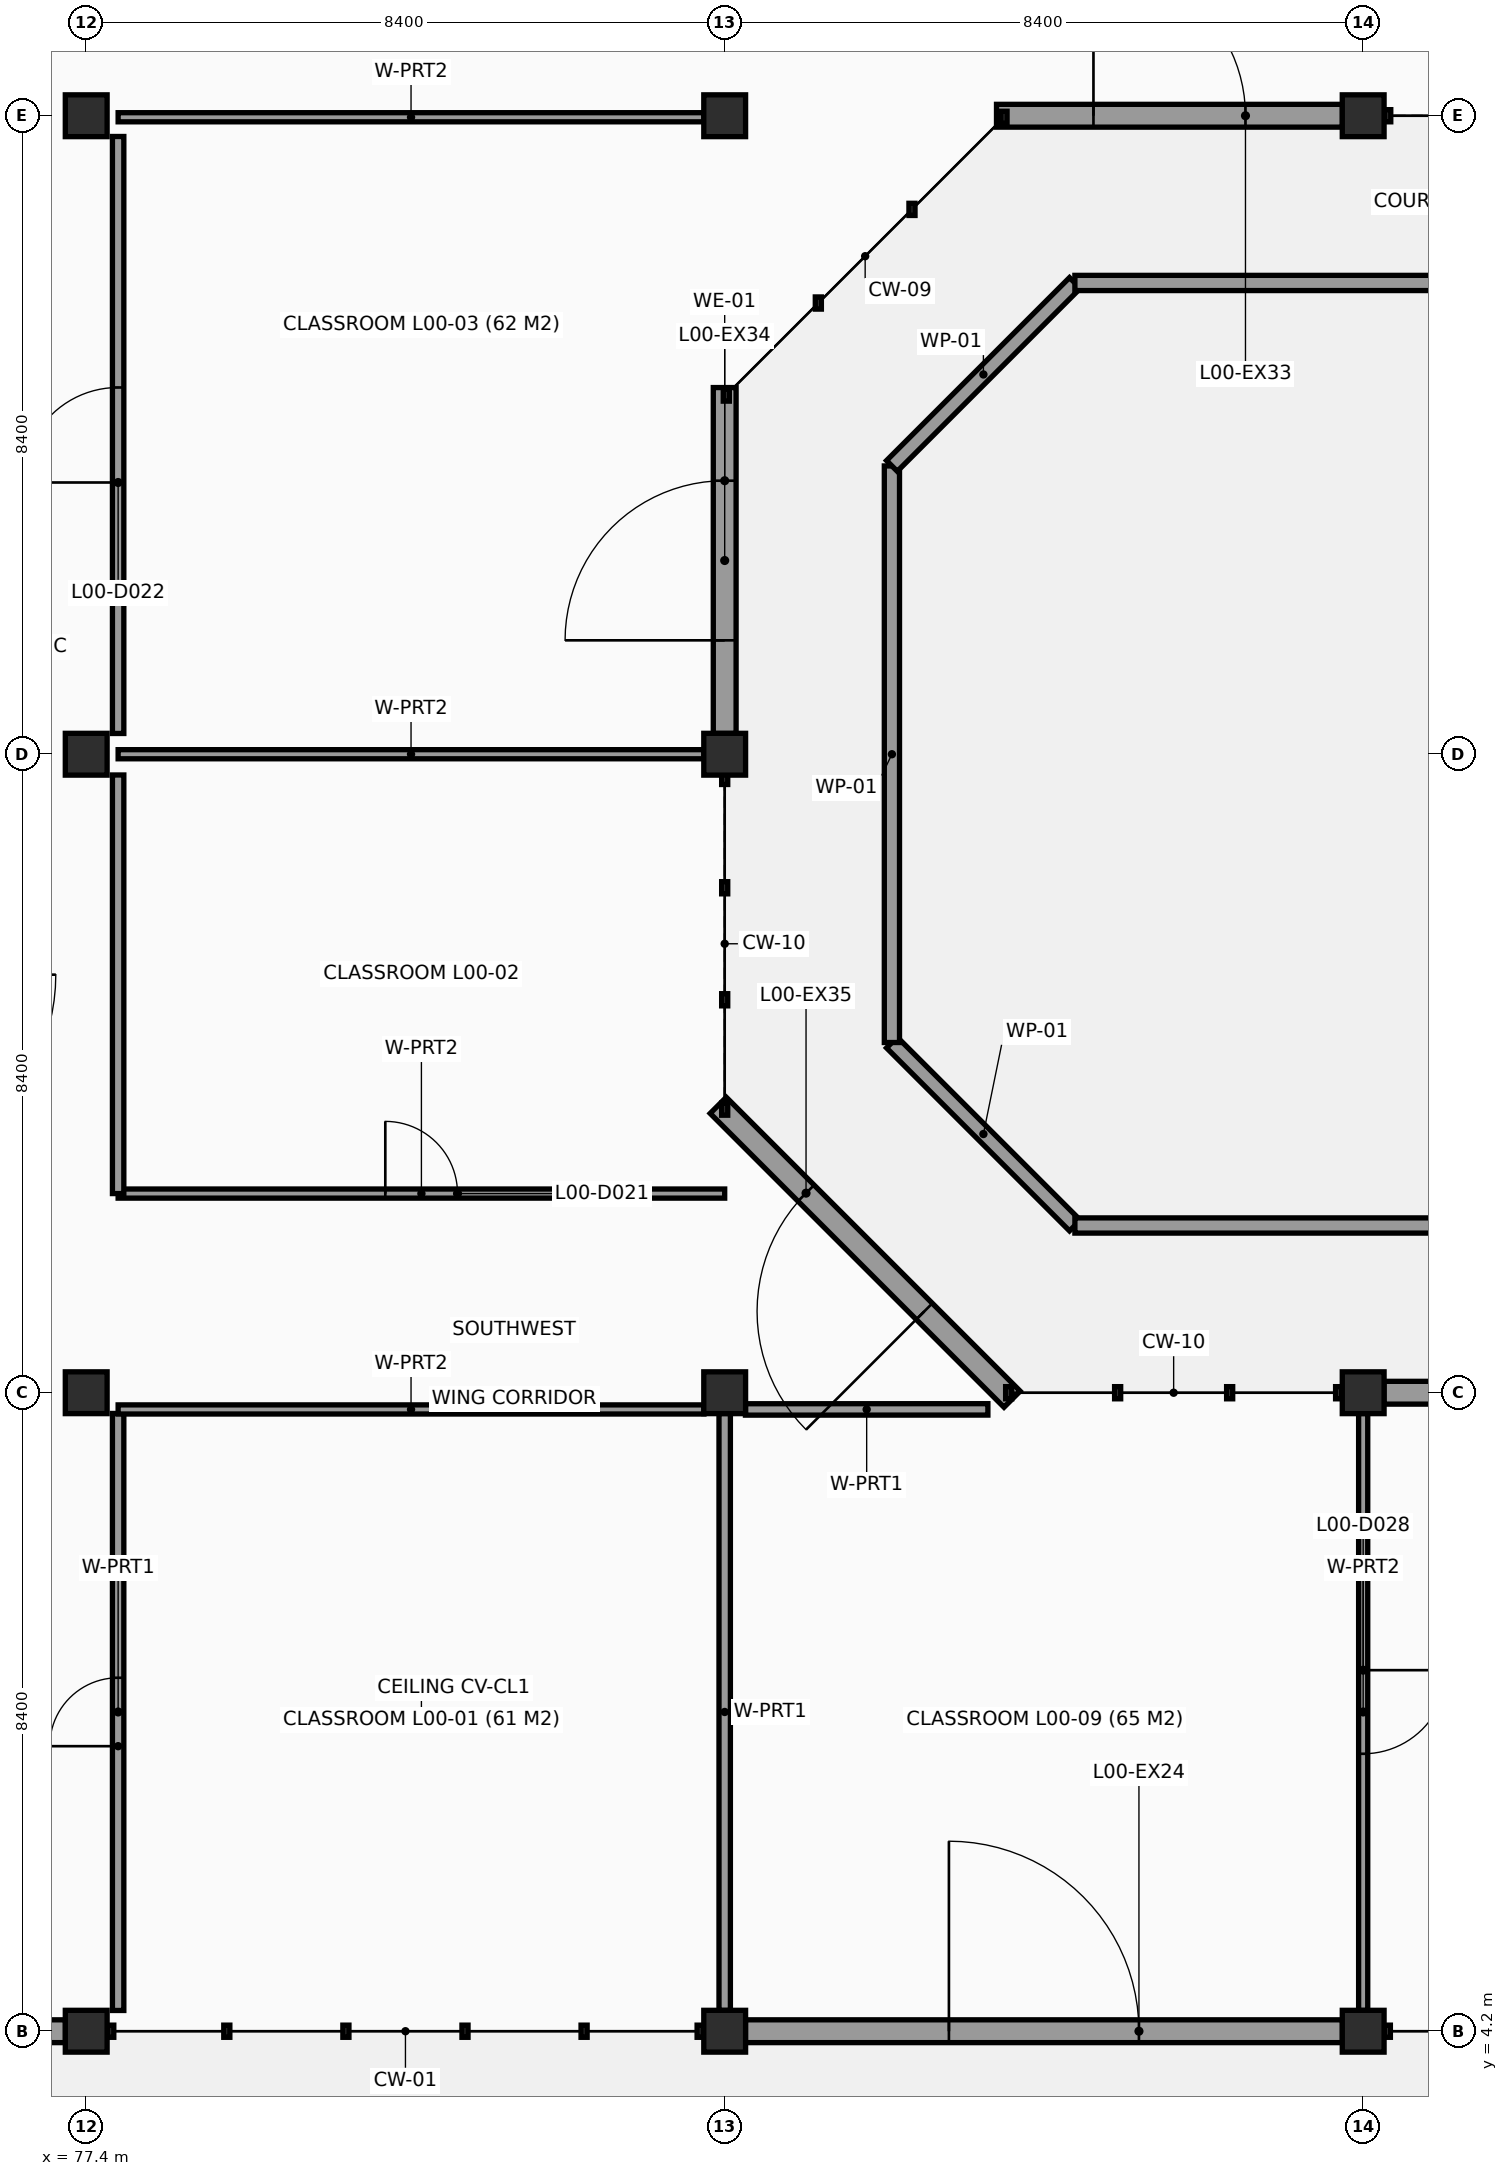
"""IFC4 building model, lengths in metres.
Left out: names, types, materials, properties, quantities, classifications, styles, units other than length and angle.
Written with IfcOpenShell. Run it as: python <this file> out.ifc"""

import sys

from ifc_helpers import new_model, si_unit, direction, frame, frame_2d, origin, origin_2d, place, context, subcontext, project, spatial, rectangle, extrude, element, fill, save


model = new_model("IFC4")
c1 = context("Model", 3, precision=1e-05, world=origin(), true_north=direction((0.0, 1.0)))
c2 = subcontext(c1, "Body", "Model", "MODEL_VIEW")
j1 = project(units=[si_unit("LENGTHUNIT", "METRE"), si_unit("PLANEANGLEUNIT", "RADIAN")], contexts=[c1])
p1 = place(None, origin())
s1 = spatial("IfcSite", under=j1, at=p1, CompositionType="ELEMENT")
p2 = place(p1, origin())
s2 = spatial("IfcBuilding", under=s1, at=p2, CompositionType="ELEMENT")
p3 = place(p2, origin())
s3 = spatial("IfcBuildingStorey", under=s2, at=p3, CompositionType="ELEMENT", Elevation=0.0)
for number, where, z_axis, x_axis in (
    (1, (77.4, 4.2, -0.4), (0.0, 0.0, 1.0), (1.0, 0.0, 0.0)),
    (2, (77.4, 12.6, -0.4), (0.0, 0.0, 1.0), (1.0, 0.0, 0.0)),
    (3, (77.4, 21.0, -0.4), (0.0, 0.0, 1.0), (1.0, 0.0, 0.0)),
    (4, (77.4, 29.4, -0.4), (0.0, 0.0, 1.0), (1.0, 0.0, 0.0)),
    (5, (85.8, 4.2, -0.4), (0.0, 0.0, 1.0), (1.0, 0.0, 0.0)),
    (6, (85.8, 12.6, -0.4), (0.0, 0.0, 1.0), (1.0, 0.0, 0.0)),
    (7, (85.8, 21.0, -0.4), (0.0, 0.0, 1.0), (1.0, 0.0, 0.0)),
    (8, (85.8, 29.4, -0.4), (0.0, 0.0, 1.0), (1.0, 0.0, 0.0)),
    (9, (94.2, 4.2, -0.4), (0.0, 0.0, 1.0), (1.0, 0.0, 0.0)),
    (10, (94.2, 12.6, -0.4), (0.0, 0.0, 1.0), (1.0, 0.0, 0.0)),
    (11, (94.2, 29.4, -0.4), (0.0, 0.0, 1.0), (1.0, 0.0, 0.0)),
):
    element("IfcColumn", number, at=place(p3, frame(where, z_axis=z_axis, x_axis=x_axis)), inside=s3, PredefinedType="COLUMN", context=c2, shape_type="SweptSolid", body=[
        extrude(rectangle(XDim=0.55, YDim=0.55, at=origin_2d()), origin(), (0.0, 0.0, 1.0), 4.6),
    ])
p4 = place(p3, frame((93.927, 4.2, 0.0), z_axis=(0.0, 0.0, 1.0), x_axis=(-1.0, 0.0, 0.0)))
e12 = element("IfcWall", 12, at=p4, inside=s3, PredefinedType="SOLIDWALL", context=c2, shape_type="SweptSolid", body=[
    extrude(rectangle(XDim=7.854, YDim=0.3, at=frame_2d((3.927, 0.0))), origin(), (0.0, 0.0, 1.0), 3.22),
])
p5 = place(p4, frame((2.677, 0.0, 0.0)))
e13 = element("IfcOpeningElement", 13, at=p5, cuts=e12, PredefinedType="OPENING", context=c2, shape_type="SweptSolid", body=[
    extrude(rectangle(XDim=2.5, YDim=2.5, at=frame_2d((1.25, 1.25))), frame((0.0, 0.16, 0.0), z_axis=(0.0, -1.0, 0.0), x_axis=(1.0, 0.0, 0.0)), (0.0, 0.0, 1.0), 0.32),
])
p6 = place(p3, frame((77.127, 4.2, 0.0), z_axis=(0.0, 0.0, 1.0), x_axis=(-1.0, 0.0, 0.0)))
e14 = element("IfcWall", 14, at=p6, inside=s3, PredefinedType="SOLIDWALL", context=c2, shape_type="SweptSolid", body=[
    extrude(rectangle(XDim=2.454, YDim=0.3, at=frame_2d((1.227, 0.0))), origin(), (0.0, 0.0, 1.0), 3.22),
])
p7 = place(p6, frame((0.627, 0.0, 0.95)))
e15 = element("IfcOpeningElement", 15, at=p7, cuts=e14, PredefinedType="OPENING", context=c2, shape_type="SweptSolid", body=[
    extrude(rectangle(XDim=1.2, YDim=2.05, at=frame_2d((0.6, 1.025))), frame((0.0, 0.16, 0.0), z_axis=(0.0, -1.0, 0.0), x_axis=(1.0, 0.0, 0.0)), (0.0, 0.0, 1.0), 0.32),
])
p8 = place(p3, frame((93.927, 29.4, 0.0), z_axis=(0.0, 0.0, 1.0), x_axis=(-1.0, 0.0, 0.0)))
e16 = element("IfcWall", 16, at=p8, inside=s3, PredefinedType="SOLIDWALL", context=c2, shape_type="SweptSolid", body=[
    extrude(rectangle(XDim=4.551, YDim=0.3, at=frame_2d((2.275, 0.0))), origin(), (0.0, 0.0, 1.0), 3.22),
])
p9 = place(p8, frame((1.275, 0.0, 0.0)))
e17 = element("IfcOpeningElement", 17, at=p9, cuts=e16, PredefinedType="OPENING", context=c2, shape_type="SweptSolid", body=[
    extrude(rectangle(XDim=2.0, YDim=2.25, at=frame_2d((1.0, 1.125))), frame((0.0, 0.16, 0.0), z_axis=(0.0, -1.0, 0.0), x_axis=(1.0, 0.0, 0.0)), (0.0, 0.0, 1.0), 0.32),
])
p10 = place(p3, frame((85.8, 25.824, 0.0), z_axis=(0.0, 0.0, 1.0), x_axis=(0.0, -1.0, 0.0)))
e18 = element("IfcWall", 18, at=p10, inside=s3, PredefinedType="SOLIDWALL", context=c2, shape_type="SweptSolid", body=[
    extrude(rectangle(XDim=4.551, YDim=0.3, at=frame_2d((2.275, 0.0))), origin(), (0.0, 0.0, 1.0), 3.22),
])
p11 = place(p10, frame((1.226, 0.0, 0.0)))
e19 = element("IfcOpeningElement", 19, at=p11, cuts=e18, PredefinedType="OPENING", context=c2, shape_type="SweptSolid", body=[
    extrude(rectangle(XDim=2.1, YDim=2.3, at=frame_2d((1.05, 1.15))), frame((0.0, 0.16, 0.0), z_axis=(0.0, -1.0, 0.0), x_axis=(1.0, 0.0, 0.0)), (0.0, 0.0, 1.0), 0.32),
])
p12 = place(p3, frame((85.715, 16.381, 0.0), z_axis=(0.0, 0.0, 1.0), x_axis=(0.707106781187, -0.707106781187, 0.0)))
e20 = element("IfcWall", 20, at=p12, inside=s3, PredefinedType="SOLIDWALL", context=c2, shape_type="SweptSolid", body=[
    extrude(rectangle(XDim=5.467, YDim=0.3, at=frame_2d((2.733, 0.0))), origin(), (0.0, 0.0, 1.0), 3.22),
])
p13 = place(p12, frame((1.634, 0.0, 0.0)))
e21 = element("IfcOpeningElement", 21, at=p13, cuts=e20, PredefinedType="OPENING", context=c2, shape_type="SweptSolid", body=[
    extrude(rectangle(XDim=2.2, YDim=2.35, at=frame_2d((1.1, 1.175))), frame((0.0, 0.16, 0.0), z_axis=(0.0, -1.0, 0.0), x_axis=(1.0, 0.0, 0.0)), (0.0, 0.0, 1.0), 0.32),
])
p14 = place(p3, frame((94.473, 12.6, 0.0), z_axis=(0.0, 0.0, 1.0), x_axis=(1.0, 0.0, 0.0)))
e22 = element("IfcWall", 22, at=p14, inside=s3, PredefinedType="SOLIDWALL", context=c2, shape_type="SweptSolid", body=[
    extrude(rectangle(XDim=7.854, YDim=0.3, at=frame_2d((3.927, 0.0))), origin(), (0.0, 0.0, 1.0), 3.22),
])
p15 = place(p14, frame((2.777, 0.0, 0.0)))
e23 = element("IfcOpeningElement", 23, at=p15, cuts=e22, PredefinedType="OPENING", context=c2, shape_type="SweptSolid", body=[
    extrude(rectangle(XDim=2.3, YDim=2.4, at=frame_2d((1.15, 1.2))), frame((0.0, 0.16, 0.0), z_axis=(0.0, -1.0, 0.0), x_axis=(1.0, 0.0, 0.0)), (0.0, 0.0, 1.0), 0.32),
])
p16 = place(p3, frame((90.407, 14.8, 0.0), z_axis=(0.0, 0.0, 1.0), x_axis=(-0.707106781187, 0.707106781187, 0.0)))
e24 = element("IfcWall", 24, at=p16, inside=s3, PredefinedType="PARAPET", context=c2, shape_type="SweptSolid", body=[
    extrude(rectangle(XDim=3.404, YDim=0.2, at=frame_2d((1.702, 0.0))), origin(), (0.0, 0.0, 1.0), 0.68),
])
p17 = place(p3, frame((88.0, 17.207, 0.0), z_axis=(0.0, 0.0, 1.0), x_axis=(0.0, 1.0, 0.0)))
e25 = element("IfcWall", 25, at=p17, inside=s3, PredefinedType="PARAPET", context=c2, shape_type="SweptSolid", body=[
    extrude(rectangle(XDim=7.585, YDim=0.2, at=frame_2d((3.793, 0.0))), origin(), (0.0, 0.0, 1.0), 0.68),
])
p18 = place(p3, frame((88.0, 24.793, 0.0), z_axis=(0.0, 0.0, 1.0), x_axis=(0.707106781187, 0.707106781187, 0.0)))
e26 = element("IfcWall", 26, at=p18, inside=s3, PredefinedType="PARAPET", context=c2, shape_type="SweptSolid", body=[
    extrude(rectangle(XDim=3.404, YDim=0.2, at=frame_2d((1.702, 0.0))), origin(), (0.0, 0.0, 1.0), 0.68),
])
for number, where, z_axis, x_axis in (
    (27, (90.407, 27.2, 0.0), (0.0, 0.0, 1.0), (1.0, 0.0, 0.0)),
    (28, (106.393, 14.8, 0.0), (0.0, 0.0, 1.0), (-1.0, 0.0, 0.0)),
):
    element("IfcWall", number, at=place(p3, frame(where, z_axis=z_axis, x_axis=x_axis)), inside=s3, PredefinedType="PARAPET", context=c2, shape_type="SweptSolid", body=[
        extrude(rectangle(XDim=15.985, YDim=0.2, at=frame_2d((7.993, 0.0))), origin(), (0.0, 0.0, 1.0), 0.68),
    ])
p19 = place(p3, frame((77.82, 4.473, 0.0), z_axis=(0.0, 0.0, 1.0), x_axis=(0.0, 1.0, 0.0)))
e29 = element("IfcWall", 29, at=p19, inside=s3, PredefinedType="PARTITIONING", context=c2, shape_type="SweptSolid", body=[
    extrude(rectangle(XDim=7.854, YDim=0.15, at=frame_2d((3.927, 0.0))), origin(), (0.0, 0.0, 1.0), 3.62),
])
p20 = place(p19, frame((3.477, 0.0, 0.0)))
e30 = element("IfcOpeningElement", 30, at=p20, cuts=e29, PredefinedType="OPENING", context=c2, shape_type="SweptSolid", body=[
    extrude(rectangle(XDim=0.9, YDim=2.05, at=frame_2d((0.45, 1.025))), frame((0.0, 0.085, 0.0), z_axis=(0.0, -1.0, 0.0), x_axis=(1.0, 0.0, 0.0)), (0.0, 0.0, 1.0), 0.17),
])
p21 = place(p3, frame((77.82, 12.38, 0.0), z_axis=(0.0, 0.0, 1.0), x_axis=(1.0, 0.0, 0.0)))
e31 = element("IfcWall", 31, at=p21, inside=s3, PredefinedType="PARTITIONING", context=c2, shape_type="SweptSolid", body=[
    extrude(rectangle(XDim=7.707, YDim=0.12, at=frame_2d((3.854, 0.0))), origin(), (0.0, 0.0, 1.0), 3.47),
])
p22 = place(p3, frame((85.8, 12.327, 0.0), z_axis=(0.0, 0.0, 1.0), x_axis=(0.0, -1.0, 0.0)))
e32 = element("IfcWall", 32, at=p22, inside=s3, PredefinedType="PARTITIONING", context=c2, shape_type="SweptSolid", body=[
    extrude(rectangle(XDim=7.854, YDim=0.15, at=frame_2d((3.927, 0.0))), origin(), (0.0, 0.0, 1.0), 3.32),
])
p23 = place(p3, frame((85.8, 15.22, 0.0), z_axis=(0.0, 0.0, 1.0), x_axis=(-1.0, 0.0, 0.0)))
e33 = element("IfcWall", 33, at=p23, inside=s3, PredefinedType="PARTITIONING", context=c2, shape_type="SweptSolid", body=[
    extrude(rectangle(XDim=7.98, YDim=0.12, at=frame_2d((3.99, 0.0))), origin(), (0.0, 0.0, 1.0), 3.22),
])
p24 = place(p23, frame((3.515, 0.0, 0.0)))
e34 = element("IfcOpeningElement", 34, at=p24, cuts=e33, PredefinedType="OPENING", context=c2, shape_type="SweptSolid", body=[
    extrude(rectangle(XDim=0.95, YDim=2.1, at=frame_2d((0.475, 1.05))), frame((0.0, 0.07, 0.0), z_axis=(0.0, -1.0, 0.0), x_axis=(1.0, 0.0, 0.0)), (0.0, 0.0, 1.0), 0.14),
])
p25 = place(p3, frame((77.82, 15.22, 0.0), z_axis=(0.0, 0.0, 1.0), x_axis=(0.0, 1.0, 0.0)))
e35 = element("IfcWall", 35, at=p25, inside=s3, PredefinedType="PARTITIONING", context=c2, shape_type="SweptSolid", body=[
    extrude(rectangle(XDim=5.507, YDim=0.15, at=frame_2d((2.753, 0.0))), origin(), (0.0, 0.0, 1.0), 3.65),
])
p26 = place(p3, frame((77.82, 21.0, 0.0), z_axis=(0.0, 0.0, 1.0), x_axis=(1.0, 0.0, 0.0)))
e36 = element("IfcWall", 36, at=p26, inside=s3, PredefinedType="PARTITIONING", context=c2, shape_type="SweptSolid", body=[
    extrude(rectangle(XDim=7.707, YDim=0.12, at=frame_2d((3.854, 0.0))), origin(), (0.0, 0.0, 1.0), 3.53),
])
p27 = place(p3, frame((77.82, 21.273, 0.0), z_axis=(0.0, 0.0, 1.0), x_axis=(0.0, 1.0, 0.0)))
e37 = element("IfcWall", 37, at=p27, inside=s3, PredefinedType="PARTITIONING", context=c2, shape_type="SweptSolid", body=[
    extrude(rectangle(XDim=7.854, YDim=0.15, at=frame_2d((3.927, 0.0))), origin(), (0.0, 0.0, 1.0), 3.42),
])
p28 = place(p27, frame((3.302, 0.0, 0.0)))
e38 = element("IfcOpeningElement", 38, at=p28, cuts=e37, PredefinedType="OPENING", context=c2, shape_type="SweptSolid", body=[
    extrude(rectangle(XDim=1.25, YDim=2.15, at=frame_2d((0.625, 1.075))), frame((0.0, 0.085, 0.0), z_axis=(0.0, -1.0, 0.0), x_axis=(1.0, 0.0, 0.0)), (0.0, 0.0, 1.0), 0.17),
])
p29 = place(p3, frame((77.82, 29.38, 0.0), z_axis=(0.0, 0.0, 1.0), x_axis=(1.0, 0.0, 0.0)))
e39 = element("IfcWall", 39, at=p29, inside=s3, PredefinedType="PARTITIONING", context=c2, shape_type="SweptSolid", body=[
    extrude(rectangle(XDim=7.707, YDim=0.12, at=frame_2d((3.854, 0.0))), origin(), (0.0, 0.0, 1.0), 3.17),
])
p30 = place(p3, frame((86.073, 12.38, 0.0), z_axis=(0.0, 0.0, 1.0), x_axis=(0.999999973637, 0.000229621119, 0.0)))
e40 = element("IfcWall", 40, at=p30, inside=s3, PredefinedType="PARTITIONING", context=c2, shape_type="SweptSolid", body=[
    extrude(rectangle(XDim=3.19, YDim=0.15, at=frame_2d((1.595, 0.0))), origin(), (0.0, 0.0, 1.0), 3.22),
])
p31 = place(p3, frame((94.2, 12.327, 0.0), z_axis=(0.0, 0.0, 1.0), x_axis=(0.0, -1.0, 0.0)))
e41 = element("IfcWall", 41, at=p31, inside=s3, PredefinedType="PARTITIONING", context=c2, shape_type="SweptSolid", body=[
    extrude(rectangle(XDim=7.854, YDim=0.12, at=frame_2d((3.927, 0.0))), origin(), (0.0, 0.0, 1.0), 3.52),
])
p32 = place(p31, frame((3.377, 0.0, 0.0)))
e42 = element("IfcOpeningElement", 42, at=p32, cuts=e41, PredefinedType="OPENING", context=c2, shape_type="SweptSolid", body=[
    extrude(rectangle(XDim=1.1, YDim=2.1, at=frame_2d((0.55, 1.05))), frame((0.0, 0.07, 0.0), z_axis=(0.0, -1.0, 0.0), x_axis=(1.0, 0.0, 0.0)), (0.0, 0.0, 1.0), 0.14),
])
p33 = place(p5, origin())
e43 = element("IfcDoor", 43, at=p33, inside=s3, OperationType="DOUBLE_DOOR_SINGLE_SWING", PredefinedType="DOOR", context=c2, shape_type="SweptSolid", body=[
    extrude(rectangle(XDim=2.5, YDim=2.5, at=frame_2d((1.25, 1.25))), frame((0.0, 0.025, 0.0), z_axis=(0.0, -1.0, 0.0), x_axis=(1.0, 0.0, 0.0)), (0.0, 0.0, 1.0), 0.05),
])
fill(e13, e43)
p34 = place(p9, origin())
e44 = element("IfcDoor", 44, at=p34, inside=s3, OperationType="DOUBLE_DOOR_SINGLE_SWING", PredefinedType="DOOR", context=c2, shape_type="SweptSolid", body=[
    extrude(rectangle(XDim=2.0, YDim=2.25, at=frame_2d((1.0, 1.125))), frame((0.0, 0.025, 0.0), z_axis=(0.0, -1.0, 0.0), x_axis=(1.0, 0.0, 0.0)), (0.0, 0.0, 1.0), 0.05),
])
fill(e17, e44)
p35 = place(p11, origin())
e45 = element("IfcDoor", 45, at=p35, inside=s3, OperationType="DOUBLE_DOOR_SINGLE_SWING", PredefinedType="DOOR", context=c2, shape_type="SweptSolid", body=[
    extrude(rectangle(XDim=2.1, YDim=2.3, at=frame_2d((1.05, 1.15))), frame((0.0, 0.025, 0.0), z_axis=(0.0, -1.0, 0.0), x_axis=(1.0, 0.0, 0.0)), (0.0, 0.0, 1.0), 0.05),
])
fill(e19, e45)
p36 = place(p13, origin())
e46 = element("IfcDoor", 46, at=p36, inside=s3, OperationType="DOUBLE_DOOR_SINGLE_SWING", PredefinedType="DOOR", context=c2, shape_type="SweptSolid", body=[
    extrude(rectangle(XDim=2.2, YDim=2.35, at=frame_2d((1.1, 1.175))), frame((0.0, 0.025, 0.0), z_axis=(0.0, -1.0, 0.0), x_axis=(1.0, 0.0, 0.0)), (0.0, 0.0, 1.0), 0.05),
])
fill(e21, e46)
p37 = place(p20, origin())
e47 = element("IfcDoor", 47, at=p37, inside=s3, OperationType="SINGLE_SWING_LEFT", PredefinedType="DOOR", context=c2, shape_type="SweptSolid", body=[
    extrude(rectangle(XDim=0.9, YDim=2.05, at=frame_2d((0.45, 1.025))), frame((0.0, 0.025, 0.0), z_axis=(0.0, -1.0, 0.0), x_axis=(1.0, 0.0, 0.0)), (0.0, 0.0, 1.0), 0.05),
])
fill(e30, e47)
p38 = place(p24, origin())
e48 = element("IfcDoor", 48, at=p38, inside=s3, OperationType="SINGLE_SWING_RIGHT", PredefinedType="DOOR", context=c2, shape_type="SweptSolid", body=[
    extrude(rectangle(XDim=0.95, YDim=2.1, at=frame_2d((0.475, 1.05))), frame((0.0, 0.025, 0.0), z_axis=(0.0, -1.0, 0.0), x_axis=(1.0, 0.0, 0.0)), (0.0, 0.0, 1.0), 0.05),
])
fill(e34, e48)
p39 = place(p28, origin())
e49 = element("IfcDoor", 49, at=p39, inside=s3, OperationType="SINGLE_SWING_LEFT", PredefinedType="DOOR", context=c2, shape_type="SweptSolid", body=[
    extrude(rectangle(XDim=1.25, YDim=2.15, at=frame_2d((0.625, 1.075))), frame((0.0, 0.025, 0.0), z_axis=(0.0, -1.0, 0.0), x_axis=(1.0, 0.0, 0.0)), (0.0, 0.0, 1.0), 0.05),
])
fill(e38, e49)
p40 = place(p32, origin())
e50 = element("IfcDoor", 50, at=p40, inside=s3, OperationType="SINGLE_SWING_LEFT", PredefinedType="DOOR", context=c2, shape_type="SweptSolid", body=[
    extrude(rectangle(XDim=1.1, YDim=2.1, at=frame_2d((0.55, 1.05))), frame((0.0, 0.025, 0.0), z_axis=(0.0, -1.0, 0.0), x_axis=(1.0, 0.0, 0.0)), (0.0, 0.0, 1.0), 0.05),
])
fill(e42, e50)
save(model, sys.argv[1])
